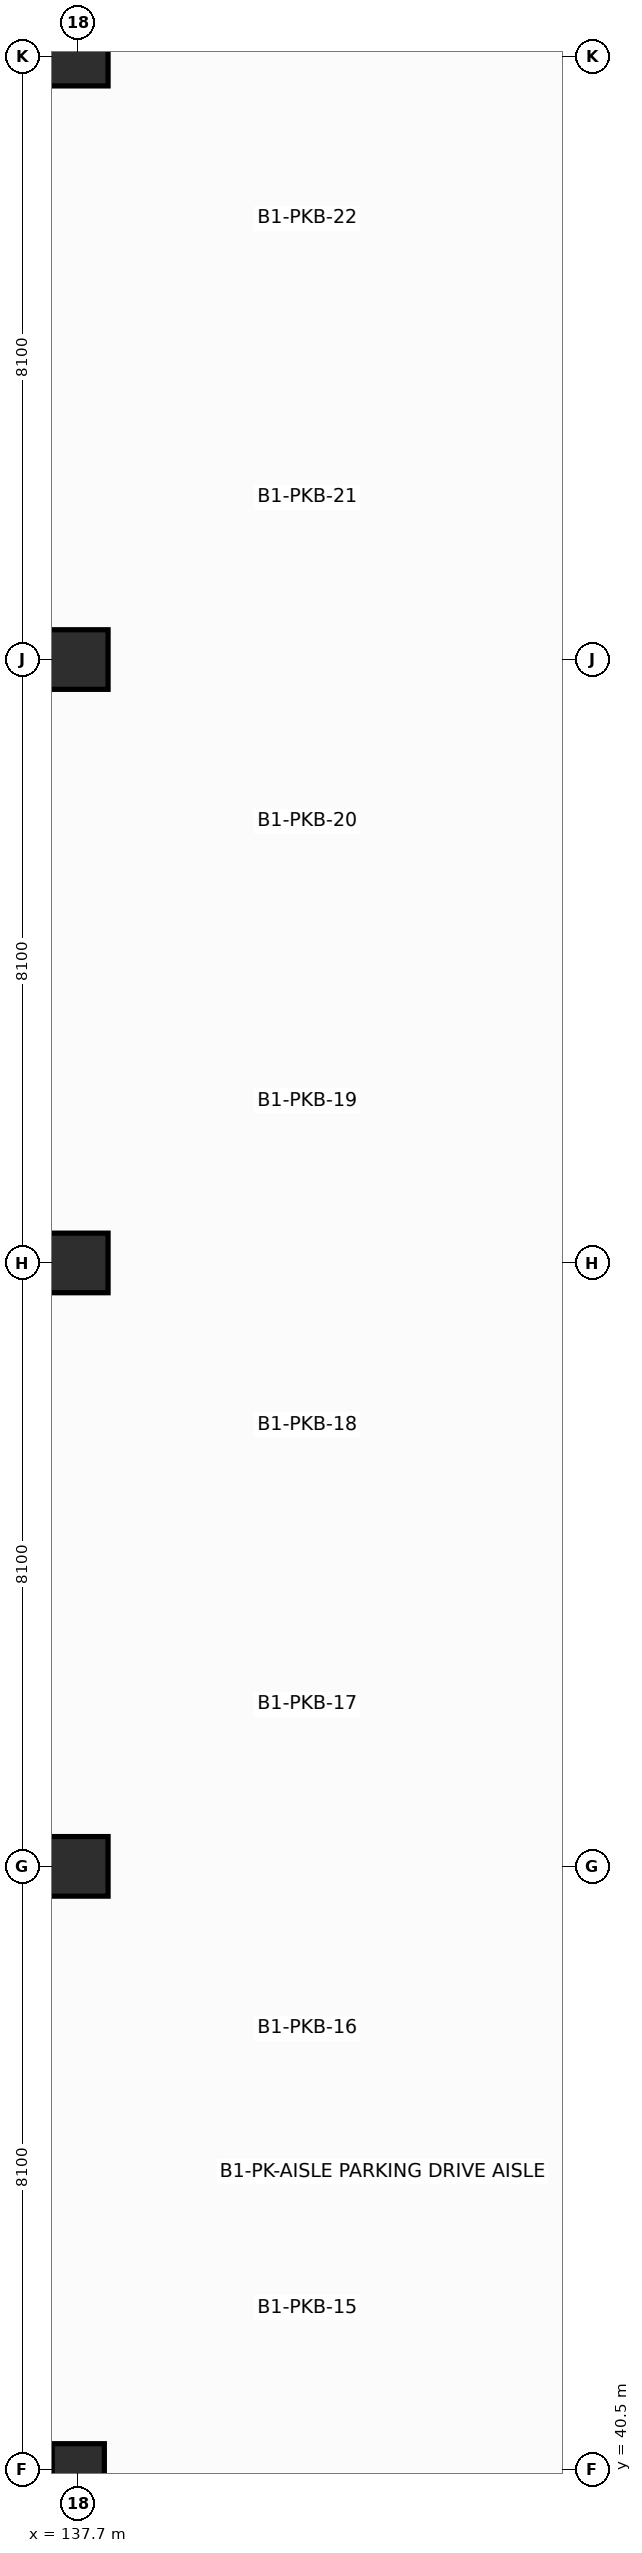
"""IFC4 building model, lengths in metres.
Left out: names, types, materials, properties, quantities, classifications, styles, units other than length and angle.
Written with IfcOpenShell. Run it as: python <this file> out.ifc"""

import sys

from ifc_helpers import new_model, si_unit, direction, frame, origin, origin_2d, place, context, subcontext, project, spatial, rectangle, extrude, element, save


model = new_model("IFC4")
c1 = context("Model", 3, precision=1e-05, world=origin(), true_north=direction((0.0, 1.0)))
c2 = subcontext(c1, "Body", "Model", "MODEL_VIEW")
j1 = project(units=[si_unit("LENGTHUNIT", "METRE"), si_unit("PLANEANGLEUNIT", "RADIAN")], contexts=[c1])
p1 = place(None, origin())
s1 = spatial("IfcSite", under=j1, at=p1, CompositionType="ELEMENT")
p2 = place(p1, origin())
s2 = spatial("IfcBuilding", under=s1, at=p2, CompositionType="ELEMENT")
p3 = place(p2, frame((0.0, 0.0, -5.4)))
s3 = spatial("IfcBuildingStorey", under=s2, at=p3, CompositionType="ELEMENT", Elevation=-5.4)
p4 = place(p3, frame((137.7, 40.5, -0.4), z_axis=(0.0, 0.0, 1.0), x_axis=(1.0, 0.0, 0.0)))
e1 = element("IfcColumn", 1, at=p4, inside=s3, PredefinedType="COLUMN", context=c2, shape_type="SweptSolid", body=[
    extrude(rectangle(XDim=0.7, YDim=0.7, at=origin_2d()), origin(), (0.0, 0.0, 1.0), 5.8),
])
for number, where, z_axis, x_axis in (
    (2, (137.7, 48.6, -0.4), (0.0, 0.0, 1.0), (1.0, 0.0, 0.0)),
    (3, (137.7, 56.7, -0.4), (0.0, 0.0, 1.0), (1.0, 0.0, 0.0)),
    (4, (137.7, 64.8, -0.4), (0.0, 0.0, 1.0), (1.0, 0.0, 0.0)),
    (5, (137.7, 72.9, -0.4), (0.0, 0.0, 1.0), (1.0, 0.0, 0.0)),
):
    element("IfcColumn", number, at=place(p3, frame(where, z_axis=z_axis, x_axis=x_axis)), inside=s3, PredefinedType="COLUMN", context=c2, shape_type="SweptSolid", body=[
        extrude(rectangle(XDim=0.8, YDim=0.8, at=origin_2d()), origin(), (0.0, 0.0, 1.0), 5.8),
    ])
save(model, sys.argv[1])
